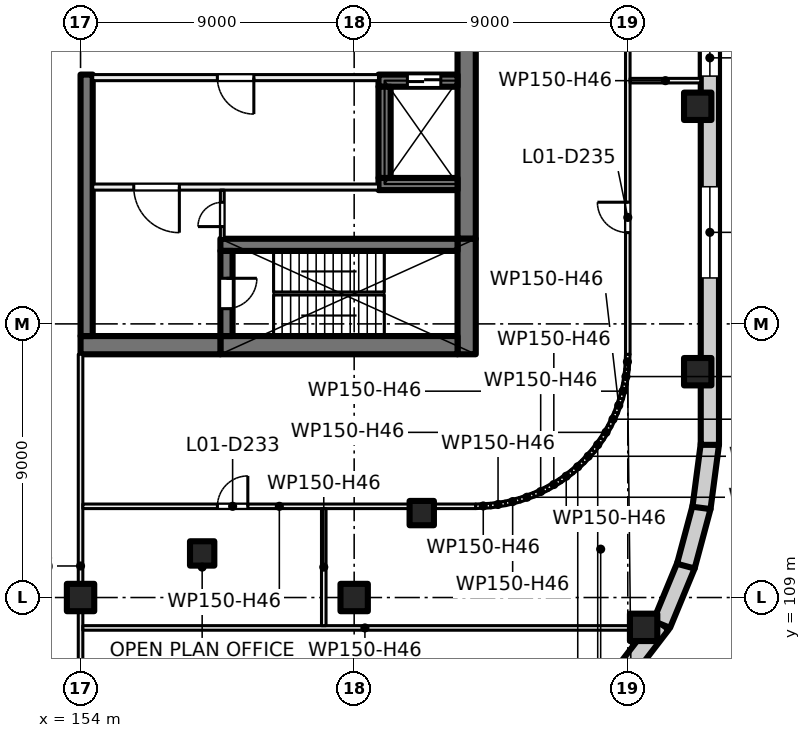
"""IFC4 building model, lengths in metres.
Left out: names, types, materials, properties, quantities, classifications, styles, units other than length and angle.
Written with IfcOpenShell. Run it as: python <this file> out.ifc"""

import sys

from ifc_helpers import new_model, si_unit, direction, frame, frame_2d, origin, origin_2d, place, context, subcontext, project, spatial, rectangle, extrude, element, fill, save


model = new_model("IFC4")
c1 = context("Model", 3, precision=1e-05, world=origin(), true_north=direction((0.0, 1.0)))
c2 = subcontext(c1, "Body", "Model", "MODEL_VIEW")
j1 = project(units=[si_unit("LENGTHUNIT", "METRE"), si_unit("PLANEANGLEUNIT", "RADIAN")], contexts=[c1])
p1 = place(None, origin())
s1 = spatial("IfcSite", under=j1, at=p1, CompositionType="ELEMENT")
p2 = place(p1, origin())
s2 = spatial("IfcBuilding", under=s1, at=p2, CompositionType="ELEMENT")
p3 = place(p2, frame((0.0, 0.0, 7.5)))
s3 = spatial("IfcBuildingStorey", under=s2, at=p3, CompositionType="ELEMENT", Elevation=7.5)
for number, where, z_axis, x_axis in (
    (1, (154.0, 109.0, 0.0), (0.0, 0.0, 1.0), (1.0, 0.0, 0.0)),
    (2, (163.0, 109.0, 0.0), (0.0, 0.0, 1.0), (1.0, 0.0, 0.0)),
    (3, (174.3, 125.157, 0.0), (0.0, 0.0, 1.0), (1.0, 0.0, 0.0)),
    (4, (174.3, 116.427, 0.0), (0.0, 0.0, 1.0), (1.0, 0.0, 0.0)),
    (5, (172.521, 108.019, 0.0), (0.0, 0.0, 1.0), (1.0, 0.0, 0.0)),
):
    element("IfcColumn", number, at=place(p3, frame(where, z_axis=z_axis, x_axis=x_axis)), inside=s3, PredefinedType="COLUMN", context=c2, shape_type="SweptSolid", body=[
        extrude(rectangle(XDim=0.9, YDim=0.9, at=origin_2d()), origin(), (0.0, 0.0, 1.0), 5.0),
    ])
for number, where, z_axis, x_axis in (
    (6, (165.223, 111.777, 0.0), (0.0, 0.0, 1.0), (1.0, 0.0, 0.0)),
    (7, (158.0, 110.45, 0.0), (0.0, 0.0, 1.0), (1.0, 0.0, 0.0)),
):
    element("IfcColumn", number, at=place(p3, frame(where, z_axis=z_axis, x_axis=x_axis)), inside=s3, PredefinedType="COLUMN", context=c2, shape_type="SweptSolid", body=[
        extrude(rectangle(XDim=0.8, YDim=0.8, at=origin_2d()), origin(), (0.0, 0.0, 1.0), 5.0),
    ])
p4 = place(p3, frame((166.7, 135.2, 0.0), z_axis=(0.0, 0.0, 1.0), x_axis=(0.0, -1.0, 0.0)))
e8 = element("IfcWall", 8, at=p4, inside=s3, PredefinedType="SHEAR", context=c2, shape_type="SweptSolid", body=[
    extrude(rectangle(XDim=14.4, YDim=0.6, at=frame_2d((7.2, 0.0))), origin(), (0.0, 0.0, 1.0), 5.0),
])
p5 = place(p3, frame((166.7, 120.8, 0.0), z_axis=(0.0, 0.0, 1.0), x_axis=(0.0, -1.0, 0.0)))
e9 = element("IfcWall", 9, at=p5, inside=s3, PredefinedType="SHEAR", context=c2, shape_type="SweptSolid", body=[
    extrude(rectangle(XDim=3.8, YDim=0.6, at=frame_2d((1.9, 0.0))), origin(), (0.0, 0.0, 1.0), 5.0),
])
p6 = place(p3, frame((166.4, 117.3, 0.0), z_axis=(0.0, 0.0, 1.0), x_axis=(-1.0, 0.0, 0.0)))
e10 = element("IfcWall", 10, at=p6, inside=s3, PredefinedType="SHEAR", context=c2, shape_type="SweptSolid", body=[
    extrude(rectangle(XDim=7.8, YDim=0.6, at=frame_2d((3.9, 0.0))), origin(), (0.0, 0.0, 1.0), 5.0),
])
p7 = place(p3, frame((158.6, 117.3, 0.0), z_axis=(0.0, 0.0, 1.0), x_axis=(-1.0, 0.0, 0.0)))
e11 = element("IfcWall", 11, at=p7, inside=s3, PredefinedType="SHEAR", context=c2, shape_type="SweptSolid", body=[
    extrude(rectangle(XDim=4.6, YDim=0.6, at=frame_2d((2.3, 0.0))), origin(), (0.0, 0.0, 1.0), 5.0),
])
p8 = place(p3, frame((166.4, 120.6, 0.0), z_axis=(0.0, 0.0, 1.0), x_axis=(-1.0, 0.0, 0.0)))
e12 = element("IfcWall", 12, at=p8, inside=s3, PredefinedType="SHEAR", context=c2, shape_type="SweptSolid", body=[
    extrude(rectangle(XDim=7.8, YDim=0.4, at=frame_2d((3.9, 0.0))), origin(), (0.0, 0.0, 1.0), 5.0),
])
p9 = place(p3, frame((158.8, 120.4, 0.0), z_axis=(0.0, 0.0, 1.0), x_axis=(0.0, -1.0, 0.0)))
e13 = element("IfcWall", 13, at=p9, inside=s3, PredefinedType="SHEAR", context=c2, shape_type="SweptSolid", body=[
    extrude(rectangle(XDim=2.8, YDim=0.4, at=frame_2d((1.4, 0.0))), origin(), (0.0, 0.0, 1.0), 5.0),
])
p10 = place(p9, frame((0.9, 0.0, 0.0)))
e14 = element("IfcOpeningElement", 14, at=p10, cuts=e13, PredefinedType="OPENING", context=c2, shape_type="SweptSolid", body=[
    extrude(rectangle(XDim=1.0, YDim=2.1, at=frame_2d((0.5, 1.05))), frame((0.0, 0.21, 0.0), z_axis=(0.0, -1.0, 0.0), x_axis=(1.0, 0.0, 0.0)), (0.0, 0.0, 1.0), 0.42),
])
p11 = place(p3, frame((166.4, 126.0, 0.0), z_axis=(0.0, 0.0, 1.0), x_axis=(-1.0, 0.0, 0.0)))
e15 = element("IfcWall", 15, at=p11, inside=s3, PredefinedType="SHEAR", context=c2, shape_type="SweptSolid", body=[
    extrude(rectangle(XDim=2.6, YDim=0.4, at=frame_2d((1.3, 0.0))), origin(), (0.0, 0.0, 1.0), 5.0),
])
p12 = place(p11, frame((0.55, 0.0, 0.0)))
e16 = element("IfcOpeningElement", 16, at=p12, cuts=e15, PredefinedType="OPENING", context=c2, shape_type="SweptSolid", body=[
    extrude(rectangle(XDim=1.1, YDim=2.1, at=frame_2d((0.55, 1.05))), frame((0.0, 0.21, 0.0), z_axis=(0.0, -1.0, 0.0), x_axis=(1.0, 0.0, 0.0)), (0.0, 0.0, 1.0), 0.42),
])
p13 = place(p3, frame((166.4, 122.6, 0.0), z_axis=(0.0, 0.0, 1.0), x_axis=(-1.0, 0.0, 0.0)))
e17 = element("IfcWall", 17, at=p13, inside=s3, PredefinedType="SHEAR", context=c2, shape_type="SweptSolid", body=[
    extrude(rectangle(XDim=2.6, YDim=0.4, at=frame_2d((1.3, 0.0))), origin(), (0.0, 0.0, 1.0), 5.0),
])
p14 = place(p3, frame((164.0, 125.8, 0.0), z_axis=(0.0, 0.0, 1.0), x_axis=(0.0, -1.0, 0.0)))
e18 = element("IfcWall", 18, at=p14, inside=s3, PredefinedType="SHEAR", context=c2, shape_type="SweptSolid", body=[
    extrude(rectangle(XDim=3.0, YDim=0.4, at=frame_2d((1.5, 0.0))), origin(), (0.0, 0.0, 1.0), 5.0),
])
p15 = place(p3, frame((154.2, 126.2, 0.0), z_axis=(0.0, 0.0, 1.0), x_axis=(0.0, -1.0, 0.0)))
e19 = element("IfcWall", 19, at=p15, inside=s3, PredefinedType="SHEAR", context=c2, shape_type="SweptSolid", body=[
    extrude(rectangle(XDim=8.6, YDim=0.4, at=frame_2d((4.3, 0.0))), origin(), (0.0, 0.0, 1.0), 5.0),
])
p16 = place(p3, frame((173.109, 108.128, 0.0), z_axis=(0.0, 0.0, 1.0), x_axis=(-0.609058260448, -0.793125485267, 0.0)))
e20 = element("IfcWall", 20, at=p16, inside=s3, PredefinedType="SOLIDWALL", context=c2, shape_type="SweptSolid", body=[
    extrude(rectangle(XDim=2.044, YDim=0.6, at=frame_2d((1.022, 0.0))), origin(), (0.0, 0.0, 1.0), 4.6),
])
p17 = place(p3, frame((173.921, 110.069, 0.0), z_axis=(0.0, 0.0, 1.0), x_axis=(-0.382375593358, -0.924006983526, 0.0)))
e21 = element("IfcWall", 21, at=p17, inside=s3, PredefinedType="SOLIDWALL", context=c2, shape_type="SweptSolid", body=[
    extrude(rectangle(XDim=2.114, YDim=0.6, at=frame_2d((1.057, 0.0))), origin(), (0.0, 0.0, 1.0), 4.6),
])
p18 = place(p3, frame((174.432, 111.986, 0.0), z_axis=(0.0, 0.0, 1.0), x_axis=(-0.258804467146, -0.965929732323, 0.0)))
e22 = element("IfcWall", 22, at=p18, inside=s3, PredefinedType="SOLIDWALL", context=c2, shape_type="SweptSolid", body=[
    extrude(rectangle(XDim=2.022, YDim=0.6, at=frame_2d((1.011, 0.0))), origin(), (0.0, 0.0, 1.0), 4.6),
])
p19 = place(p3, frame((174.703, 114.061, 0.0), z_axis=(0.0, 0.0, 1.0), x_axis=(-0.130558200013, -0.991440646942, 0.0)))
e23 = element("IfcWall", 23, at=p19, inside=s3, PredefinedType="SOLIDWALL", context=c2, shape_type="SweptSolid", body=[
    extrude(rectangle(XDim=2.132, YDim=0.6, at=frame_2d((1.066, 0.0))), origin(), (0.0, 0.0, 1.0), 4.6),
])
p20 = place(p3, frame((174.7, 141.978, 0.0), z_axis=(0.0, 0.0, 1.0), x_axis=(0.0, -1.0, 0.0)))
e24 = element("IfcWall", 24, at=p20, inside=s3, PredefinedType="SOLIDWALL", context=c2, shape_type="SweptSolid", body=[
    extrude(rectangle(XDim=27.957, YDim=0.6, at=frame_2d((13.978, 0.0))), origin(), (0.0, 0.0, 1.0), 4.6),
])
p21 = place(p20, frame((0.83, 0.0, 0.9)))
e25 = element("IfcOpeningElement", 25, at=p21, cuts=e24, PredefinedType="OPENING", context=c2, shape_type="SweptSolid", body=[
    extrude(rectangle(XDim=3.0, YDim=3.0, at=frame_2d((1.5, 1.5))), frame((0.0, 0.31, 0.0), z_axis=(0.0, -1.0, 0.0), x_axis=(1.0, 0.0, 0.0)), (0.0, 0.0, 1.0), 0.62),
])
p22 = place(p20, frame((10.148, 0.0, 0.9)))
e26 = element("IfcOpeningElement", 26, at=p22, cuts=e24, PredefinedType="OPENING", context=c2, shape_type="SweptSolid", body=[
    extrude(rectangle(XDim=3.0, YDim=3.0, at=frame_2d((1.5, 1.5))), frame((0.0, 0.31, 0.0), z_axis=(0.0, -1.0, 0.0), x_axis=(1.0, 0.0, 0.0)), (0.0, 0.0, 1.0), 0.62),
])
p23 = place(p20, frame((14.628, 0.0, 0.9)))
e27 = element("IfcOpeningElement", 27, at=p23, cuts=e24, PredefinedType="OPENING", context=c2, shape_type="SweptSolid", body=[
    extrude(rectangle(XDim=1.2, YDim=3.0, at=frame_2d((0.6, 1.5))), frame((0.0, 0.31, 0.0), z_axis=(0.0, -1.0, 0.0), x_axis=(1.0, 0.0, 0.0)), (0.0, 0.0, 1.0), 0.62),
])
p24 = place(p20, frame((19.467, 0.0, 0.9)))
e28 = element("IfcOpeningElement", 28, at=p24, cuts=e24, PredefinedType="OPENING", context=c2, shape_type="SweptSolid", body=[
    extrude(rectangle(XDim=3.0, YDim=3.0, at=frame_2d((1.5, 1.5))), frame((0.0, 0.31, 0.0), z_axis=(0.0, -1.0, 0.0), x_axis=(1.0, 0.0, 0.0)), (0.0, 0.0, 1.0), 0.62),
])
p25 = place(p3, frame((163.8, 126.1, 0.0), z_axis=(0.0, 0.0, 1.0), x_axis=(-1.0, 0.0, 0.0)))
e29 = element("IfcWall", 29, at=p25, inside=s3, PredefinedType="PARTITIONING", context=c2, shape_type="SweptSolid", body=[
    extrude(rectangle(XDim=9.4, YDim=0.2, at=frame_2d((4.7, 0.0))), origin(), (0.0, 0.0, 1.0), 4.6),
])
p26 = place(p25, frame((4.1, 0.0, 0.0)))
e30 = element("IfcOpeningElement", 30, at=p26, cuts=e29, PredefinedType="OPENING", context=c2, shape_type="SweptSolid", body=[
    extrude(rectangle(XDim=1.2, YDim=2.1, at=frame_2d((0.6, 1.05))), frame((0.0, 0.11, 0.0), z_axis=(0.0, -1.0, 0.0), x_axis=(1.0, 0.0, 0.0)), (0.0, 0.0, 1.0), 0.22),
])
p27 = place(p3, frame((163.8, 122.5, 0.0), z_axis=(0.0, 0.0, 1.0), x_axis=(-1.0, 0.0, 0.0)))
e31 = element("IfcWall", 31, at=p27, inside=s3, PredefinedType="PARTITIONING", context=c2, shape_type="SweptSolid", body=[
    extrude(rectangle(XDim=9.4, YDim=0.2, at=frame_2d((4.7, 0.0))), origin(), (0.0, 0.0, 1.0), 4.6),
])
p28 = place(p27, frame((6.55, 0.0, 0.0)))
e32 = element("IfcOpeningElement", 32, at=p28, cuts=e31, PredefinedType="OPENING", context=c2, shape_type="SweptSolid", body=[
    extrude(rectangle(XDim=1.5, YDim=2.1, at=frame_2d((0.75, 1.05))), frame((0.0, 0.11, 0.0), z_axis=(0.0, -1.0, 0.0), x_axis=(1.0, 0.0, 0.0)), (0.0, 0.0, 1.0), 0.22),
])
p29 = place(p3, frame((158.663, 120.8, 0.0), z_axis=(0.0, 0.0, 1.0), x_axis=(0.0, 1.0, 0.0)))
e33 = element("IfcWall", 33, at=p29, inside=s3, PredefinedType="PARTITIONING", context=c2, shape_type="SweptSolid", body=[
    extrude(rectangle(XDim=1.6, YDim=0.125, at=frame_2d((0.8, 0.0))), origin(), (0.0, 0.0, 1.0), 4.6),
])
p30 = place(p29, frame((0.4, 0.0, 0.0)))
e34 = element("IfcOpeningElement", 34, at=p30, cuts=e33, PredefinedType="OPENING", context=c2, shape_type="SweptSolid", body=[
    extrude(rectangle(XDim=0.8, YDim=2.1, at=frame_2d((0.4, 1.05))), frame((0.0, 0.073, 0.0), z_axis=(0.0, -1.0, 0.0), x_axis=(1.0, 0.0, 0.0)), (0.0, 0.0, 1.0), 0.145),
])
p31 = place(p3, frame((154.0, 103.075, 0.0), z_axis=(0.0, 0.0, 1.0), x_axis=(0.0, 1.0, 0.0)))
e35 = element("IfcWall", 35, at=p31, inside=s3, PredefinedType="PARTITIONING", context=c2, shape_type="SweptSolid", body=[
    extrude(rectangle(XDim=13.925, YDim=0.15, at=frame_2d((6.962, 0.0))), origin(), (0.0, 0.0, 1.0), 4.6),
])
p32 = place(p3, frame((154.075, 108.0, 0.0), z_axis=(0.0, 0.0, 1.0), x_axis=(1.0, 0.0, 0.0)))
e36 = element("IfcWall", 36, at=p32, inside=s3, PredefinedType="PARTITIONING", context=c2, shape_type="SweptSolid", body=[
    extrude(rectangle(XDim=18.557, YDim=0.15, at=frame_2d((9.279, 0.0))), origin(), (0.0, 0.0, 1.0), 4.6),
])
p33 = place(p3, frame((167.002, 112.0, 0.0), z_axis=(0.0, 0.0, 1.0), x_axis=(-1.0, 0.0, 0.0)))
e37 = element("IfcWall", 37, at=p33, inside=s3, PredefinedType="PARTITIONING", context=c2, shape_type="SweptSolid", body=[
    extrude(rectangle(XDim=12.927, YDim=0.15, at=frame_2d((6.463, 0.0))), origin(), (0.0, 0.0, 1.0), 4.6),
])
p34 = place(p33, frame((7.5, 0.0, 0.0)))
e38 = element("IfcOpeningElement", 38, at=p34, cuts=e37, PredefinedType="OPENING", context=c2, shape_type="SweptSolid", body=[
    extrude(rectangle(XDim=1.0, YDim=2.1, at=frame_2d((0.5, 1.05))), frame((0.0, 0.085, 0.0), z_axis=(0.0, -1.0, 0.0), x_axis=(1.0, 0.0, 0.0)), (0.0, 0.0, 1.0), 0.17),
])
p35 = place(p3, frame((162.0, 108.075, 0.0), z_axis=(0.0, 0.0, 1.0), x_axis=(0.0, 1.0, 0.0)))
e39 = element("IfcWall", 39, at=p35, inside=s3, PredefinedType="PARTITIONING", context=c2, shape_type="SweptSolid", body=[
    extrude(rectangle(XDim=3.85, YDim=0.15, at=frame_2d((1.925, 0.0))), origin(), (0.0, 0.0, 1.0), 4.6),
])
p36 = place(p3, frame((166.998, 112.0, 0.0), z_axis=(0.0, 0.0, 1.0), x_axis=(0.998837896651, 0.048196018647, 0.0)))
e40 = element("IfcWall", 40, at=p36, inside=s3, PredefinedType="PARTITIONING", context=c2, shape_type="SweptSolid", body=[
    extrude(rectangle(XDim=0.496, YDim=0.15, at=frame_2d((0.248, 0.0))), origin(), (0.0, 0.0, 1.0), 4.6),
])
p37 = place(p3, frame((167.486, 112.023, 0.0), z_axis=(0.0, 0.0, 1.0), x_axis=(0.988925572052, 0.148412307247, 0.0)))
e41 = element("IfcWall", 41, at=p37, inside=s3, PredefinedType="PARTITIONING", context=c2, shape_type="SweptSolid", body=[
    extrude(rectangle(XDim=0.499, YDim=0.15, at=frame_2d((0.249, 0.0))), origin(), (0.0, 0.0, 1.0), 4.6),
])
p38 = place(p3, frame((167.971, 112.095, 0.0), z_axis=(0.0, 0.0, 1.0), x_axis=(0.970113715952, 0.242650732785, 0.0)))
e42 = element("IfcWall", 42, at=p38, inside=s3, PredefinedType="PARTITIONING", context=c2, shape_type="SweptSolid", body=[
    extrude(rectangle(XDim=0.499, YDim=0.15, at=frame_2d((0.25, 0.0))), origin(), (0.0, 0.0, 1.0), 4.6),
])
for number, where, z_axis, x_axis in (
    (43, (168.447, 112.214, 0.0), (0.0, 0.0, 1.0), (0.941, 0.337, 0.0)),
    (44, (168.91, 112.379, 0.0), (0.0, 0.0, 1.0), (0.904, 0.428, 0.0)),
):
    element("IfcWall", number, at=place(p3, frame(where, z_axis=z_axis, x_axis=x_axis)), inside=s3, PredefinedType="PARTITIONING", context=c2, shape_type="SweptSolid", body=[
        extrude(rectangle(XDim=0.498, YDim=0.15, at=frame_2d((0.249, 0.0))), origin(), (0.0, 0.0, 1.0), 4.6),
    ])
p39 = place(p3, frame((169.354, 112.588, 0.0), z_axis=(0.0, 0.0, 1.0), x_axis=(0.85671397893, 0.515791778052, 0.0)))
e45 = element("IfcWall", 45, at=p39, inside=s3, PredefinedType="PARTITIONING", context=c2, shape_type="SweptSolid", body=[
    extrude(rectangle(XDim=0.499, YDim=0.15, at=frame_2d((0.249, 0.0))), origin(), (0.0, 0.0, 1.0), 4.6),
])
p40 = place(p3, frame((169.775, 112.841, 0.0), z_axis=(0.0, 0.0, 1.0), x_axis=(0.80404358372, 0.594570362092, 0.0)))
e46 = element("IfcWall", 46, at=p40, inside=s3, PredefinedType="PARTITIONING", context=c2, shape_type="SweptSolid", body=[
    extrude(rectangle(XDim=0.498, YDim=0.15, at=frame_2d((0.249, 0.0))), origin(), (0.0, 0.0, 1.0), 4.6),
])
for number, where, z_axis, x_axis in (
    (47, (170.169, 113.133, 0.0), (0.0, 0.0, 1.0), (0.742, 0.67, 0.0)),
    (48, (170.533, 113.461, 0.0), (0.0, 0.0, 1.0), (0.67, 0.742, 0.0)),
):
    element("IfcWall", number, at=place(p3, frame(where, z_axis=z_axis, x_axis=x_axis)), inside=s3, PredefinedType="PARTITIONING", context=c2, shape_type="SweptSolid", body=[
        extrude(rectangle(XDim=0.499, YDim=0.15, at=frame_2d((0.249, 0.0))), origin(), (0.0, 0.0, 1.0), 4.6),
    ])
p41 = place(p3, frame((170.863, 113.825, 0.0), z_axis=(0.0, 0.0, 1.0), x_axis=(0.594570362092, 0.80404358372, 0.0)))
e49 = element("IfcWall", 49, at=p41, inside=s3, PredefinedType="PARTITIONING", context=c2, shape_type="SweptSolid", body=[
    extrude(rectangle(XDim=0.498, YDim=0.15, at=frame_2d((0.249, 0.0))), origin(), (0.0, 0.0, 1.0), 4.6),
])
p42 = place(p3, frame((171.155, 114.219, 0.0), z_axis=(0.0, 0.0, 1.0), x_axis=(0.515791778052, 0.85671397893, 0.0)))
e50 = element("IfcWall", 50, at=p42, inside=s3, PredefinedType="PARTITIONING", context=c2, shape_type="SweptSolid", body=[
    extrude(rectangle(XDim=0.499, YDim=0.15, at=frame_2d((0.249, 0.0))), origin(), (0.0, 0.0, 1.0), 4.6),
])
for number, where, z_axis, x_axis in (
    (51, (171.408, 114.64, 0.0), (0.0, 0.0, 1.0), (0.428, 0.904, 0.0)),
    (52, (171.618, 115.084, 0.0), (0.0, 0.0, 1.0), (0.337, 0.941, 0.0)),
):
    element("IfcWall", number, at=place(p3, frame(where, z_axis=z_axis, x_axis=x_axis)), inside=s3, PredefinedType="PARTITIONING", context=c2, shape_type="SweptSolid", body=[
        extrude(rectangle(XDim=0.498, YDim=0.15, at=frame_2d((0.249, 0.0))), origin(), (0.0, 0.0, 1.0), 4.6),
    ])
p43 = place(p3, frame((171.784, 115.545, 0.0), z_axis=(0.0, 0.0, 1.0), x_axis=(0.242650732785, 0.970113715952, 0.0)))
e53 = element("IfcWall", 53, at=p43, inside=s3, PredefinedType="PARTITIONING", context=c2, shape_type="SweptSolid", body=[
    extrude(rectangle(XDim=0.499, YDim=0.15, at=frame_2d((0.25, 0.0))), origin(), (0.0, 0.0, 1.0), 4.6),
])
p44 = place(p3, frame((171.903, 116.021, 0.0), z_axis=(0.0, 0.0, 1.0), x_axis=(0.148412307247, 0.988925572052, 0.0)))
e54 = element("IfcWall", 54, at=p44, inside=s3, PredefinedType="PARTITIONING", context=c2, shape_type="SweptSolid", body=[
    extrude(rectangle(XDim=0.499, YDim=0.15, at=frame_2d((0.249, 0.0))), origin(), (0.0, 0.0, 1.0), 4.6),
])
p45 = place(p3, frame((171.976, 116.506, 0.0), z_axis=(0.0, 0.0, 1.0), x_axis=(0.048196018647, 0.998837896651, 0.0)))
e55 = element("IfcWall", 55, at=p45, inside=s3, PredefinedType="PARTITIONING", context=c2, shape_type="SweptSolid", body=[
    extrude(rectangle(XDim=0.496, YDim=0.15, at=frame_2d((0.248, 0.0))), origin(), (0.0, 0.0, 1.0), 4.6),
])
p46 = place(p3, frame((172.0, 139.002, 0.0), z_axis=(0.0, 0.0, 1.0), x_axis=(0.0, -1.0, 0.0)))
e56 = element("IfcWall", 56, at=p46, inside=s3, PredefinedType="PARTITIONING", context=c2, shape_type="SweptSolid", body=[
    extrude(rectangle(XDim=22.004, YDim=0.15, at=frame_2d((11.002, 0.0))), origin(), (0.0, 0.0, 1.0), 4.6),
])
p47 = place(p46, frame((17.0, 0.0, 0.0)))
e57 = element("IfcOpeningElement", 57, at=p47, cuts=e56, PredefinedType="OPENING", context=c2, shape_type="SweptSolid", body=[
    extrude(rectangle(XDim=1.0, YDim=2.1, at=frame_2d((0.5, 1.05))), frame((0.0, 0.085, 0.0), z_axis=(0.0, -1.0, 0.0), x_axis=(1.0, 0.0, 0.0)), (0.0, 0.0, 1.0), 0.17),
])
p48 = place(p46, frame((6.004, 0.0, 0.0)))
e58 = element("IfcOpeningElement", 58, at=p48, cuts=e56, PredefinedType="OPENING", context=c2, shape_type="SweptSolid", body=[
    extrude(rectangle(XDim=1.0, YDim=2.1, at=frame_2d((0.5, 1.05))), frame((0.0, 0.085, 0.0), z_axis=(0.0, -1.0, 0.0), x_axis=(1.0, 0.0, 0.0)), (0.0, 0.0, 1.0), 0.17),
])
p49 = place(p3, frame((172.075, 126.0, 0.0), z_axis=(0.0, 0.0, 1.0), x_axis=(1.0, 0.0, 0.0)))
e59 = element("IfcWall", 59, at=p49, inside=s3, PredefinedType="PARTITIONING", context=c2, shape_type="SweptSolid", body=[
    extrude(rectangle(XDim=2.325, YDim=0.15, at=frame_2d((1.163, 0.0))), origin(), (0.0, 0.0, 1.0), 4.6),
])
p50 = place(p23, origin())
e60 = element("IfcWindow", 60, at=p50, inside=s3, PartitioningType="SINGLE_PANEL", PredefinedType="WINDOW", context=c2, shape_type="SweptSolid", body=[
    extrude(rectangle(XDim=1.2, YDim=3.0, at=frame_2d((0.6, 1.5))), frame((0.0, 0.03, 0.0), z_axis=(0.0, -1.0, 0.0), x_axis=(1.0, 0.0, 0.0)), (0.0, 0.0, 1.0), 0.06),
])
fill(e27, e60)
p51 = place(p24, origin())
e61 = element("IfcWindow", 61, at=p51, inside=s3, PartitioningType="SINGLE_PANEL", PredefinedType="WINDOW", context=c2, shape_type="SweptSolid", body=[
    extrude(rectangle(XDim=3.0, YDim=3.0, at=frame_2d((1.5, 1.5))), frame((0.0, 0.03, 0.0), z_axis=(0.0, -1.0, 0.0), x_axis=(1.0, 0.0, 0.0)), (0.0, 0.0, 1.0), 0.06),
])
fill(e28, e61)
p52 = place(p12, origin())
e62 = element("IfcDoor", 62, at=p52, inside=s3, OperationType="DOUBLE_DOOR_SLIDING", PredefinedType="DOOR", context=c2, shape_type="SweptSolid", body=[
    extrude(rectangle(XDim=1.1, YDim=2.1, at=frame_2d((0.55, 1.05))), frame((0.0, 0.025, 0.0), z_axis=(0.0, -1.0, 0.0), x_axis=(1.0, 0.0, 0.0)), (0.0, 0.0, 1.0), 0.05),
])
fill(e16, e62)
p53 = place(p26, origin())
e63 = element("IfcDoor", 63, at=p53, inside=s3, OperationType="DOUBLE_DOOR_SINGLE_SWING", PredefinedType="DOOR", context=c2, shape_type="SweptSolid", body=[
    extrude(rectangle(XDim=1.2, YDim=2.1, at=frame_2d((0.6, 1.05))), frame((0.0, 0.025, 0.0), z_axis=(0.0, -1.0, 0.0), x_axis=(1.0, 0.0, 0.0)), (0.0, 0.0, 1.0), 0.05),
])
fill(e30, e63)
p54 = place(p28, origin())
e64 = element("IfcDoor", 64, at=p54, inside=s3, OperationType="DOUBLE_DOOR_SINGLE_SWING", PredefinedType="DOOR", context=c2, shape_type="SweptSolid", body=[
    extrude(rectangle(XDim=1.5, YDim=2.1, at=frame_2d((0.75, 1.05))), frame((0.0, 0.025, 0.0), z_axis=(0.0, -1.0, 0.0), x_axis=(1.0, 0.0, 0.0)), (0.0, 0.0, 1.0), 0.05),
])
fill(e32, e64)
p55 = place(p10, origin())
e65 = element("IfcDoor", 65, at=p55, inside=s3, OperationType="SINGLE_SWING_LEFT", PredefinedType="DOOR", context=c2, shape_type="SweptSolid", body=[
    extrude(rectangle(XDim=1.0, YDim=2.1, at=frame_2d((0.5, 1.05))), frame((0.0, 0.025, 0.0), z_axis=(0.0, -1.0, 0.0), x_axis=(1.0, 0.0, 0.0)), (0.0, 0.0, 1.0), 0.05),
])
fill(e14, e65)
p56 = place(p30, origin())
e66 = element("IfcDoor", 66, at=p56, inside=s3, OperationType="SINGLE_SWING_RIGHT", PredefinedType="DOOR", context=c2, shape_type="SweptSolid", body=[
    extrude(rectangle(XDim=0.8, YDim=2.1, at=frame_2d((0.4, 1.05))), frame((0.0, 0.025, 0.0), z_axis=(0.0, -1.0, 0.0), x_axis=(1.0, 0.0, 0.0)), (0.0, 0.0, 1.0), 0.05),
])
fill(e34, e66)
p57 = place(p34, origin())
e67 = element("IfcDoor", 67, at=p57, inside=s3, OperationType="SINGLE_SWING_LEFT", PredefinedType="DOOR", context=c2, shape_type="SweptSolid", body=[
    extrude(rectangle(XDim=1.0, YDim=2.1, at=frame_2d((0.5, 1.05))), frame((0.0, 0.025, 0.0), z_axis=(0.0, -1.0, 0.0), x_axis=(1.0, 0.0, 0.0)), (0.0, 0.0, 1.0), 0.05),
])
fill(e38, e67)
p58 = place(p47, origin())
e68 = element("IfcDoor", 68, at=p58, inside=s3, OperationType="SINGLE_SWING_LEFT", PredefinedType="DOOR", context=c2, shape_type="SweptSolid", body=[
    extrude(rectangle(XDim=1.0, YDim=2.1, at=frame_2d((0.5, 1.05))), frame((0.0, 0.025, 0.0), z_axis=(0.0, -1.0, 0.0), x_axis=(1.0, 0.0, 0.0)), (0.0, 0.0, 1.0), 0.05),
])
fill(e57, e68)
save(model, sys.argv[1])
